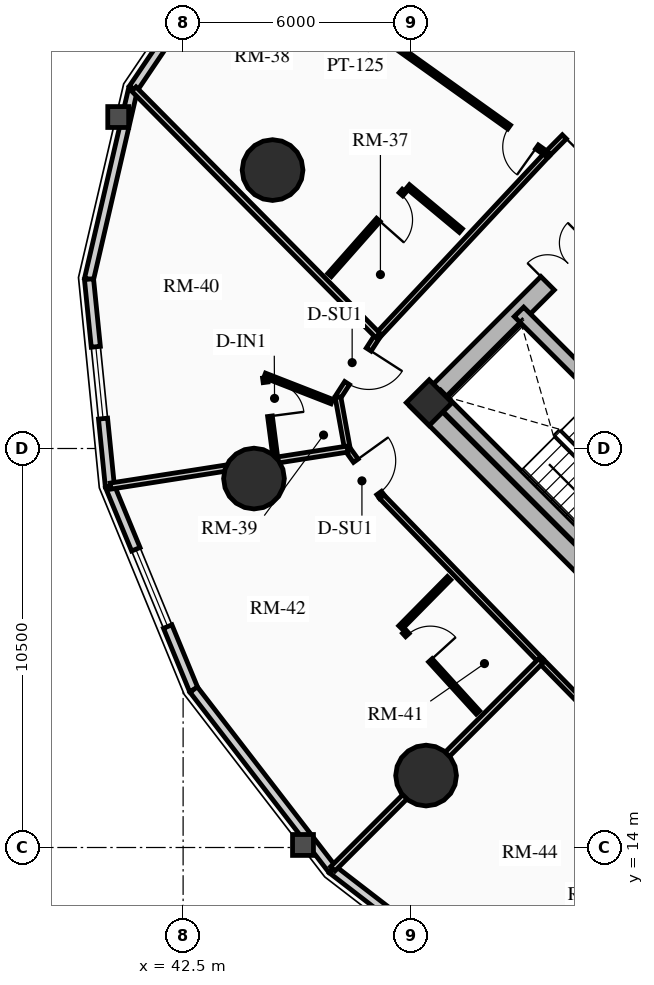
"""IFC4 building model, lengths in metres.
Left out: names, types, materials, properties, quantities, classifications, styles, units other than length and angle.
Written with IfcOpenShell. Run it as: python <this file> out.ifc"""

import sys

from ifc_helpers import new_model, si_unit, direction, frame, frame_2d, origin, origin_2d, place, context, subcontext, project, spatial, rectangle, circle, extrude, source, transform, mapped, element, fill, save


model = new_model("IFC4")
c1 = context("Model", 3, precision=1e-05, world=origin(), true_north=direction((0.0, 1.0)))
c2 = subcontext(c1, "Body", "Model", "MODEL_VIEW")
j1 = project(units=[si_unit("LENGTHUNIT", "METRE"), si_unit("PLANEANGLEUNIT", "RADIAN")], contexts=[c1])
p1 = place(None, origin())
s1 = spatial("IfcSite", under=j1, at=p1, CompositionType="ELEMENT")
p2 = place(p1, origin())
s2 = spatial("IfcBuilding", under=s1, at=p2, CompositionType="ELEMENT")
p3 = place(p2, frame((0.0, 0.0, 54.01)))
s3 = spatial("IfcBuildingStorey", under=s2, at=p3, CompositionType="ELEMENT", Elevation=54.01)
p4 = place(p3, frame((58.773, 15.661, 0.0), z_axis=(0.0, 0.0, 1.0), x_axis=(-0.707106781187, 0.707106781187, 0.0)))
e1 = element("IfcWall", 1, at=p4, inside=s3, PredefinedType="SHEAR", context=c2, shape_type="SweptSolid", body=[
    extrude(rectangle(XDim=14.3, YDim=0.5, at=frame_2d((7.15, 0.0))), origin(), (0.0, 0.0, 1.0), 2.91),
])
p5 = place(p3, frame((48.838, 25.596, 0.0), z_axis=(0.0, 0.0, 1.0), x_axis=(0.707106781187, 0.707106781187, 0.0)))
e2 = element("IfcWall", 2, at=p5, inside=s3, PredefinedType="SHEAR", context=c2, shape_type="SweptSolid", body=[
    extrude(rectangle(XDim=10.7, YDim=0.5, at=frame_2d((5.35, 0.0))), origin(), (0.0, 0.0, 1.0), 2.91),
])
m1 = source(origin(), c2, "Body", "SweptSolid", [
    extrude(rectangle(XDim=1.5, YDim=2.02, at=frame_2d((0.75, 1.01))), frame((0.0, 0.26, 0.0), z_axis=(0.0, -1.0, 0.0), x_axis=(1.0, 0.0, 0.0)), (0.0, 0.0, 1.0), 0.52),
])
p6 = place(p5, frame((4.6, 0.0, 0.0)))
e3 = element("IfcOpeningElement", 3, at=p6, cuts=e2, PredefinedType="OPENING", context=c2, shape_type="MappedRepresentation", body=[
    mapped(m1, transform((0.0, 0.0, 0.0), x_axis=(1.0, 0.0, 0.0), y_axis=(0.0, 1.0, 0.0), z_axis=(0.0, 0.0, 1.0), scale=1.0)),
])
p7 = place(p3, frame((61.096, 18.338, 0.0), z_axis=(0.0, 0.0, 1.0), x_axis=(-0.707106781187, 0.707106781187, 0.0)))
e4 = element("IfcWall", 4, at=p7, inside=s3, PredefinedType="SHEAR", context=c2, shape_type="SweptSolid", body=[
    extrude(rectangle(XDim=13.8, YDim=0.35, at=frame_2d((6.9, 0.0))), origin(), (0.0, 0.0, 1.0), 2.91),
])
m2 = source(origin(), c2, "Body", "SweptSolid", [
    extrude(rectangle(XDim=1.1, YDim=2.015, at=frame_2d((0.55, 1.007))), frame((0.0, 0.185, 0.0), z_axis=(0.0, -1.0, 0.0), x_axis=(1.0, 0.0, 0.0)), (0.0, 0.0, 1.0), 0.37),
])
p8 = place(p7, frame((4.9, 0.0, 0.0)))
e5 = element("IfcOpeningElement", 5, at=p8, cuts=e4, PredefinedType="OPENING", context=c2, shape_type="MappedRepresentation", body=[
    mapped(m2, transform((0.0, 0.0, 0.0), x_axis=(1.0, 0.0, 0.0), y_axis=(0.0, 1.0, 0.0), z_axis=(0.0, 0.0, 1.0), scale=1.0)),
])
m3 = source(origin(), c2, "Body", "SweptSolid", [
    extrude(rectangle(XDim=1.15, YDim=2.02, at=frame_2d((0.575, 1.01))), frame((0.0, 0.185, 0.0), z_axis=(0.0, -1.0, 0.0), x_axis=(1.0, 0.0, 0.0)), (0.0, 0.0, 1.0), 0.37),
])
p9 = place(p7, frame((7.32, 0.0, 0.0)))
e6 = element("IfcOpeningElement", 6, at=p9, cuts=e4, PredefinedType="OPENING", context=c2, shape_type="MappedRepresentation", body=[
    mapped(m3, transform((0.0, 0.0, 0.0), x_axis=(1.0, 0.0, 0.0), y_axis=(0.0, 1.0, 0.0), z_axis=(0.0, 0.0, 1.0), scale=1.0)),
])
p10 = place(p3, frame((53.922, 21.141, 0.0), z_axis=(0.0, 0.0, 1.0), x_axis=(-0.707106781187, 0.707106781187, 0.0)))
e7 = element("IfcWall", 7, at=p10, inside=s3, PredefinedType="SHEAR", context=c2, shape_type="SweptSolid", body=[
    extrude(rectangle(XDim=6.745, YDim=0.35, at=frame_2d((3.373, 0.0))), origin(), (0.0, 0.0, 1.0), 2.91),
])
p11 = place(p3, frame((48.976, 25.706, 0.0), z_axis=(0.0, 0.0, 1.0), x_axis=(0.707106781187, 0.707106781187, 0.0)))
e8 = element("IfcColumn", 8, at=p11, inside=s3, PredefinedType="COLUMN", context=c2, shape_type="SweptSolid", body=[
    extrude(rectangle(XDim=0.85, YDim=0.85, at=origin_2d()), origin(), (0.0, 0.0, 1.0), 2.91),
])
for number, where, z_axis, x_axis in (
    (9, (44.854, 31.827, 0.0), (0.0, 0.0, 1.0), (1.0, 0.0, 0.0)),
    (10, (44.365, 23.709, 0.0), (0.0, 0.0, 1.0), (1.0, 0.0, 0.0)),
    (11, (48.893, 15.893, 0.0), (0.0, 0.0, 1.0), (1.0, 0.0, 0.0)),
):
    element("IfcColumn", number, at=place(p3, frame(where, z_axis=z_axis, x_axis=x_axis)), inside=s3, PredefinedType="USERDEFINED", context=c2, shape_type="SweptSolid", body=[
        extrude(circle(Radius=0.8, at=origin_2d()), origin(), (0.0, 0.0, 1.0), 2.91),
    ])
p12 = place(p3, frame((41.186, 33.969, 0.0), z_axis=(0.0, 0.0, 1.0), x_axis=(0.559638693991, 0.828736708604, 0.0)))
e12 = element("IfcWall", 12, at=p12, inside=s3, PredefinedType="SOLIDWALL", context=c2, shape_type="SweptSolid", body=[
    extrude(rectangle(XDim=4.93, YDim=0.24, at=frame_2d((2.465, 0.0))), origin(), (0.0, 0.0, 1.0), 2.073),
])
m4 = source(origin(), c2, "Body", "SweptSolid", [
    extrude(rectangle(XDim=2.2, YDim=1.35, at=frame_2d((1.1, 0.675))), frame((0.0, 0.13, 0.0), z_axis=(0.0, -1.0, 0.0), x_axis=(1.0, 0.0, 0.0)), (0.0, 0.0, 1.0), 0.26),
])
p13 = place(p12, frame((1.365, 0.0, 0.65)))
e13 = element("IfcOpeningElement", 13, at=p13, cuts=e12, PredefinedType="OPENING", context=c2, shape_type="MappedRepresentation", body=[
    mapped(m4, transform((0.0, 0.0, 0.0), x_axis=(1.0, 0.0, 0.0), y_axis=(0.0, 1.0, 0.0), z_axis=(0.0, 0.0, 1.0), scale=1.0)),
])
p14 = place(p3, frame((40.024, 28.957, 0.0), z_axis=(0.0, 0.0, 1.0), x_axis=(0.225833060959, 0.974166016949, 0.0)))
e14 = element("IfcWall", 14, at=p14, inside=s3, PredefinedType="SOLIDWALL", context=c2, shape_type="SweptSolid", body=[
    extrude(rectangle(XDim=5.146, YDim=0.24, at=frame_2d((2.573, 0.0))), origin(), (0.0, 0.0, 1.0), 2.073),
])
p15 = place(p3, frame((40.572, 23.507, 0.0), z_axis=(0.0, 0.0, 1.0), x_axis=(-0.100165739718, 0.994970765694, 0.0)))
e15 = element("IfcWall", 15, at=p15, inside=s3, PredefinedType="SOLIDWALL", context=c2, shape_type="SweptSolid", body=[
    extrude(rectangle(XDim=5.477, YDim=0.24, at=frame_2d((2.738, 0.0))), origin(), (0.0, 0.0, 1.0), 2.073),
])
m5 = source(origin(), c2, "Body", "SweptSolid", [
    extrude(rectangle(XDim=1.9, YDim=1.35, at=frame_2d((0.95, 0.675))), frame((0.0, 0.13, 0.0), z_axis=(0.0, -1.0, 0.0), x_axis=(1.0, 0.0, 0.0)), (0.0, 0.0, 1.0), 0.26),
])
p16 = place(p15, frame((1.788, 0.0, 0.65)))
e16 = element("IfcOpeningElement", 16, at=p16, cuts=e15, PredefinedType="OPENING", context=c2, shape_type="MappedRepresentation", body=[
    mapped(m5, transform((0.0, 0.0, 0.0), x_axis=(1.0, 0.0, 0.0), y_axis=(0.0, 1.0, 0.0), z_axis=(0.0, 0.0, 1.0), scale=1.0)),
])
p17 = place(p3, frame((42.778, 18.156, 0.0), z_axis=(0.0, 0.0, 1.0), x_axis=(-0.381027682565, 0.924563629567, 0.0)))
e17 = element("IfcWall", 17, at=p17, inside=s3, PredefinedType="SOLIDWALL", context=c2, shape_type="SweptSolid", body=[
    extrude(rectangle(XDim=5.789, YDim=0.24, at=frame_2d((2.894, 0.0))), origin(), (0.0, 0.0, 1.0), 2.073),
])
p18 = place(p17, frame((1.794, 0.0, 0.65)))
e18 = element("IfcOpeningElement", 18, at=p18, cuts=e17, PredefinedType="OPENING", context=c2, shape_type="MappedRepresentation", body=[
    mapped(m4, transform((0.0, 0.0, 0.0), x_axis=(1.0, 0.0, 0.0), y_axis=(0.0, 1.0, 0.0), z_axis=(0.0, 0.0, 1.0), scale=1.0)),
])
p19 = place(p3, frame((46.425, 13.425, 0.0), z_axis=(0.0, 0.0, 1.0), x_axis=(-0.610502519057, 0.792014314407, 0.0)))
e19 = element("IfcWall", 19, at=p19, inside=s3, PredefinedType="SOLIDWALL", context=c2, shape_type="SweptSolid", body=[
    extrude(rectangle(XDim=5.973, YDim=0.24, at=frame_2d((2.987, 0.0))), origin(), (0.0, 0.0, 1.0), 2.073),
])
p20 = place(p3, frame((51.156, 9.778, 0.0), z_axis=(0.0, 0.0, 1.0), x_axis=(-0.792014314407, 0.610502519057, 0.0)))
e20 = element("IfcWall", 20, at=p20, inside=s3, PredefinedType="SOLIDWALL", context=c2, shape_type="SweptSolid", body=[
    extrude(rectangle(XDim=5.973, YDim=0.24, at=frame_2d((2.987, 0.0))), origin(), (0.0, 0.0, 1.0), 2.073),
])
p21 = place(p20, frame((2.037, 0.0, 0.65)))
e21 = element("IfcOpeningElement", 21, at=p21, cuts=e20, PredefinedType="OPENING", context=c2, shape_type="MappedRepresentation", body=[
    mapped(m5, transform((0.0, 0.0, 0.0), x_axis=(1.0, 0.0, 0.0), y_axis=(0.0, 1.0, 0.0), z_axis=(0.0, 0.0, 1.0), scale=1.0)),
])
p22 = place(p3, frame((54.461, 34.648, 0.0), z_axis=(0.0, 0.0, 1.0), x_axis=(-0.70403409755, -0.710166170334, 0.0)))
e22 = element("IfcWall", 22, at=p22, inside=s3, PredefinedType="PARTITIONING", context=c2, shape_type="SweptSolid", body=[
    extrude(rectangle(XDim=3.384, YDim=0.15, at=frame_2d((1.692, 0.0))), origin(), (0.0, 0.0, 1.0), 2.159),
])
m6 = source(origin(), c2, "Body", "SweptSolid", [
    extrude(rectangle(XDim=1.05, YDim=2.015, at=frame_2d((0.525, 1.007))), frame((0.0, 0.085, 0.0), z_axis=(0.0, -1.0, 0.0), x_axis=(1.0, 0.0, 0.0)), (0.0, 0.0, 1.0), 0.17),
])
p23 = place(p22, frame((1.691, 0.0, 0.0)))
e23 = element("IfcOpeningElement", 23, at=p23, cuts=e22, PredefinedType="OPENING", context=c2, shape_type="MappedRepresentation", body=[
    mapped(m6, transform((0.0, 0.0, 0.0), x_axis=(1.0, 0.0, 0.0), y_axis=(0.0, 1.0, 0.0), z_axis=(0.0, 0.0, 1.0), scale=1.0)),
])
p24 = place(p3, frame((52.079, 32.244, 0.0), z_axis=(0.0, 0.0, 1.0), x_axis=(-0.682703325574, -0.730695674854, 0.0)))
e24 = element("IfcWall", 24, at=p24, inside=s3, PredefinedType="PARTITIONING", context=c2, shape_type="SweptSolid", body=[
    extrude(rectangle(XDim=6.527, YDim=0.15, at=frame_2d((3.263, 0.0))), origin(), (0.0, 0.0, 1.0), 2.159),
])
p25 = place(p3, frame((47.623, 27.475, 0.0), z_axis=(0.0, 0.0, 1.0), x_axis=(-0.54158041545, -0.840648947898, 0.0)))
e25 = element("IfcWall", 25, at=p25, inside=s3, PredefinedType="PARTITIONING", context=c2, shape_type="SweptSolid", body=[
    extrude(rectangle(XDim=1.934, YDim=0.15, at=frame_2d((0.967, 0.0))), origin(), (0.0, 0.0, 1.0), 2.159),
])
p26 = place(p25, frame((0.442, 0.0, 0.0)))
e26 = element("IfcOpeningElement", 26, at=p26, cuts=e25, PredefinedType="OPENING", context=c2, shape_type="MappedRepresentation", body=[
    mapped(m6, transform((0.0, 0.0, 0.0), x_axis=(1.0, 0.0, 0.0), y_axis=(0.0, 1.0, 0.0), z_axis=(0.0, 0.0, 1.0), scale=1.0)),
])
p27 = place(p3, frame((46.576, 25.85, 0.0), z_axis=(0.0, 0.0, 1.0), x_axis=(0.178962865041, -0.983855829345, 0.0)))
e27 = element("IfcWall", 27, at=p27, inside=s3, PredefinedType="PARTITIONING", context=c2, shape_type="SweptSolid", body=[
    extrude(rectangle(XDim=1.387, YDim=0.15, at=frame_2d((0.694, 0.0))), origin(), (0.0, 0.0, 1.0), 2.159),
])
p28 = place(p3, frame((46.824, 24.485, 0.0), z_axis=(0.0, 0.0, 1.0), x_axis=(0.584890953925, -0.811111935565, 0.0)))
e28 = element("IfcWall", 28, at=p28, inside=s3, PredefinedType="PARTITIONING", context=c2, shape_type="SweptSolid", body=[
    extrude(rectangle(XDim=1.547, YDim=0.15, at=frame_2d((0.773, 0.0))), origin(), (0.0, 0.0, 1.0), 2.205),
])
p29 = place(p28, frame((0.377, 0.0, 0.0)))
e29 = element("IfcOpeningElement", 29, at=p29, cuts=e28, PredefinedType="OPENING", context=c2, shape_type="MappedRepresentation", body=[
    mapped(m6, transform((0.0, 0.0, 0.0), x_axis=(1.0, 0.0, 0.0), y_axis=(0.0, 1.0, 0.0), z_axis=(0.0, 0.0, 1.0), scale=1.0)),
])
p30 = place(p3, frame((47.729, 23.23, 0.0), z_axis=(0.0, 0.0, 1.0), x_axis=(0.696119834292, -0.717925606386, 0.0)))
e30 = element("IfcWall", 30, at=p30, inside=s3, PredefinedType="PARTITIONING", context=c2, shape_type="SweptSolid", body=[
    extrude(rectangle(XDim=6.012, YDim=0.15, at=frame_2d((3.006, 0.0))), origin(), (0.0, 0.0, 1.0), 2.635),
])
p31 = place(p3, frame((51.914, 18.914, 0.0), z_axis=(0.0, 0.0, 1.0), x_axis=(0.6999614951, -0.71418058317, 0.0)))
e31 = element("IfcWall", 31, at=p31, inside=s3, PredefinedType="PARTITIONING", context=c2, shape_type="SweptSolid", body=[
    extrude(rectangle(XDim=6.13, YDim=0.15, at=frame_2d((3.065, 0.0))), origin(), (0.0, 0.0, 1.0), 2.159),
])
p32 = place(p31, frame((2.54, 0.0, 0.0)))
e32 = element("IfcOpeningElement", 32, at=p32, cuts=e31, PredefinedType="OPENING", context=c2, shape_type="MappedRepresentation", body=[
    mapped(m6, transform((0.0, 0.0, 0.0), x_axis=(1.0, 0.0, 0.0), y_axis=(0.0, 1.0, 0.0), z_axis=(0.0, 0.0, 1.0), scale=1.0)),
])
p33 = place(p3, frame((54.461, 34.648, 0.0), z_axis=(0.0, 0.0, 1.0), x_axis=(-0.722290498621, 0.691589788532, 0.0)))
e33 = element("IfcWall", 33, at=p33, inside=s3, PredefinedType="PARTITIONING", context=c2, shape_type="SweptSolid", body=[
    extrude(rectangle(XDim=8.891, YDim=0.16, at=frame_2d((4.445, 0.0))), origin(), (0.0, 0.0, 1.0), 2.073),
])
p34 = place(p3, frame((47.623, 27.475, 0.0), z_axis=(0.0, 0.0, 1.0), x_axis=(-0.703512438021, 0.71068294587, 0.0)))
e34 = element("IfcWall", 34, at=p34, inside=s3, PredefinedType="PARTITIONING", context=c2, shape_type="SweptSolid", body=[
    extrude(rectangle(XDim=9.125, YDim=0.16, at=frame_2d((4.562, 0.0))), origin(), (0.0, 0.0, 1.0), 2.073),
])
p35 = place(p3, frame((46.824, 24.485, 0.0), z_axis=(0.0, 0.0, 1.0), x_axis=(-0.988003730645, -0.154430010784, 0.0)))
e35 = element("IfcWall", 35, at=p35, inside=s3, PredefinedType="PARTITIONING", context=c2, shape_type="SweptSolid", body=[
    extrude(rectangle(XDim=6.308, YDim=0.16, at=frame_2d((3.154, 0.0))), origin(), (0.0, 0.0, 1.0), 2.073),
])
p36 = place(p3, frame((51.914, 18.914, 0.0), z_axis=(0.0, 0.0, 1.0), x_axis=(-0.707106781187, -0.707106781187, 0.0)))
e36 = element("IfcWall", 36, at=p36, inside=s3, PredefinedType="PARTITIONING", context=c2, shape_type="SweptSolid", body=[
    extrude(rectangle(XDim=7.743, YDim=0.16, at=frame_2d((3.872, 0.0))), origin(), (0.0, 0.0, 1.0), 2.073),
])
p37 = place(p3, frame((52.079, 32.244, 0.0), z_axis=(0.0, 0.0, 1.0), x_axis=(-0.813888867537, 0.581020577346, 0.0)))
e37 = element("IfcWall", 37, at=p37, inside=s3, PredefinedType="PARTITIONING", context=c2, shape_type="SweptSolid", body=[
    extrude(rectangle(XDim=9.977, YDim=0.125, at=frame_2d((4.988, 0.0))), origin(), (0.0, 0.0, 1.0), 2.073),
])
m7 = source(origin(), c2, "Body", "SweptSolid", [
    extrude(rectangle(XDim=0.9, YDim=2.005, at=frame_2d((0.45, 1.002))), frame((0.0, 0.073, 0.0), z_axis=(0.0, -1.0, 0.0), x_axis=(1.0, 0.0, 0.0)), (0.0, 0.0, 1.0), 0.145),
])
p38 = place(p37, frame((0.33, 0.0, 0.0)))
e38 = element("IfcOpeningElement", 38, at=p38, cuts=e37, PredefinedType="OPENING", context=c2, shape_type="MappedRepresentation", body=[
    mapped(m7, transform((0.0, 0.0, 0.0), x_axis=(1.0, 0.0, 0.0), y_axis=(0.0, 1.0, 0.0), z_axis=(0.0, 0.0, 1.0), scale=1.0)),
])
p39 = place(p3, frame((49.809, 30.234, 0.0), z_axis=(0.0, 0.0, 1.0), x_axis=(-0.76830950514, 0.640078514177, 0.0)))
e39 = element("IfcWall", 39, at=p39, inside=s3, PredefinedType="PARTITIONING", context=c2, shape_type="SweptSolid", body=[
    extrude(rectangle(XDim=1.814, YDim=0.125, at=frame_2d((0.907, 0.0))), origin(), (0.0, 0.0, 1.0), 2.635),
])
p40 = place(p3, frame((48.313, 31.28, 0.0), z_axis=(0.0, 0.0, 1.0), x_axis=(-0.662230126621, -0.749300513409, 0.0)))
e40 = element("IfcWall", 40, at=p40, inside=s3, PredefinedType="PARTITIONING", context=c2, shape_type="SweptSolid", body=[
    extrude(rectangle(XDim=2.958, YDim=0.125, at=frame_2d((1.479, 0.0))), origin(), (0.0, 0.0, 1.0), 2.159),
])
p41 = place(p40, frame((0.12, 0.0, 0.0)))
e41 = element("IfcOpeningElement", 41, at=p41, cuts=e40, PredefinedType="OPENING", context=c2, shape_type="MappedRepresentation", body=[
    mapped(m7, transform((0.0, 0.0, 0.0), x_axis=(1.0, 0.0, 0.0), y_axis=(0.0, 1.0, 0.0), z_axis=(0.0, 0.0, 1.0), scale=1.0)),
])
p42 = place(p3, frame((46.416, 25.735, 0.0), z_axis=(0.0, 0.0, 1.0), x_axis=(-0.931623241188, 0.363425558373, 0.0)))
e42 = element("IfcWall", 42, at=p42, inside=s3, PredefinedType="PARTITIONING", context=c2, shape_type="SweptSolid", body=[
    extrude(rectangle(XDim=1.9, YDim=0.125, at=frame_2d((0.95, 0.0))), origin(), (0.0, 0.0, 1.0), 2.635),
])
p43 = place(p3, frame((44.654, 26.361, 0.0), z_axis=(0.0, 0.0, 1.0), x_axis=(0.129433729192, -0.991588074629, 0.0)))
e43 = element("IfcWall", 43, at=p43, inside=s3, PredefinedType="PARTITIONING", context=c2, shape_type="SweptSolid", body=[
    extrude(rectangle(XDim=2.097, YDim=0.125, at=frame_2d((1.049, 0.0))), origin(), (0.0, 0.0, 1.0), 2.073),
])
p44 = place(p43, frame((0.12, 0.0, 0.0)))
e44 = element("IfcOpeningElement", 44, at=p44, cuts=e43, PredefinedType="OPENING", context=c2, shape_type="MappedRepresentation", body=[
    mapped(m7, transform((0.0, 0.0, 0.0), x_axis=(1.0, 0.0, 0.0), y_axis=(0.0, 1.0, 0.0), z_axis=(0.0, 0.0, 1.0), scale=1.0)),
])
p45 = place(p3, frame((49.498, 21.087, 0.0), z_axis=(0.0, 0.0, 1.0), x_axis=(-0.702129708151, -0.71204906638, 0.0)))
e45 = element("IfcWall", 45, at=p45, inside=s3, PredefinedType="PARTITIONING", context=c2, shape_type="SweptSolid", body=[
    extrude(rectangle(XDim=1.821, YDim=0.125, at=frame_2d((0.911, 0.0))), origin(), (0.0, 0.0, 1.0), 2.635),
])
p46 = place(p3, frame((48.32, 19.68, 0.0), z_axis=(0.0, 0.0, 1.0), x_axis=(0.673403410236, -0.739275217414, 0.0)))
e46 = element("IfcWall", 46, at=p46, inside=s3, PredefinedType="PARTITIONING", context=c2, shape_type="SweptSolid", body=[
    extrude(rectangle(XDim=2.876, YDim=0.125, at=frame_2d((1.438, 0.0))), origin(), (0.0, 0.0, 1.0), 2.635),
])
p47 = place(p46, frame((0.12, 0.0, 0.0)))
e47 = element("IfcOpeningElement", 47, at=p47, cuts=e46, PredefinedType="OPENING", context=c2, shape_type="MappedRepresentation", body=[
    mapped(m7, transform((0.0, 0.0, 0.0), x_axis=(1.0, 0.0, 0.0), y_axis=(0.0, 1.0, 0.0), z_axis=(0.0, 0.0, 1.0), scale=1.0)),
])
m8 = source(origin(), c2, "Body", "SweptSolid", [
    extrude(rectangle(XDim=1.9, YDim=1.35, at=frame_2d((0.95, 0.675))), frame((0.0, 0.03, 0.0), z_axis=(0.0, -1.0, 0.0), x_axis=(1.0, 0.0, 0.0)), (0.0, 0.0, 1.0), 0.06),
])
p48 = place(p16, origin())
e48 = element("IfcWindow", 48, at=p48, inside=s3, PartitioningType="DOUBLE_PANEL_VERTICAL", PredefinedType="WINDOW", context=c2, shape_type="MappedRepresentation", body=[
    mapped(m8, transform((0.0, 0.0, 0.0), x_axis=(1.0, 0.0, 0.0), y_axis=(0.0, 1.0, 0.0), z_axis=(0.0, 0.0, 1.0), scale=1.0)),
])
fill(e16, e48)
m9 = source(origin(), c2, "Body", "SweptSolid", [
    extrude(rectangle(XDim=2.2, YDim=1.35, at=frame_2d((1.1, 0.675))), frame((0.0, 0.03, 0.0), z_axis=(0.0, -1.0, 0.0), x_axis=(1.0, 0.0, 0.0)), (0.0, 0.0, 1.0), 0.06),
])
p49 = place(p18, origin())
e49 = element("IfcWindow", 49, at=p49, inside=s3, PartitioningType="DOUBLE_PANEL_VERTICAL", PredefinedType="WINDOW", context=c2, shape_type="MappedRepresentation", body=[
    mapped(m9, transform((0.0, 0.0, 0.0), x_axis=(1.0, 0.0, 0.0), y_axis=(0.0, 1.0, 0.0), z_axis=(0.0, 0.0, 1.0), scale=1.0)),
])
fill(e18, e49)
m10 = source(origin(), c2, "Body", "SweptSolid", [
    extrude(rectangle(XDim=1.5, YDim=2.02, at=frame_2d((0.75, 1.01))), frame((0.0, 0.025, 0.0), z_axis=(0.0, -1.0, 0.0), x_axis=(1.0, 0.0, 0.0)), (0.0, 0.0, 1.0), 0.05),
])
p50 = place(p6, origin())
e50 = element("IfcDoor", 50, at=p50, inside=s3, OperationType="DOUBLE_DOOR_SINGLE_SWING", PredefinedType="DOOR", context=c2, shape_type="MappedRepresentation", body=[
    mapped(m10, transform((0.0, 0.0, 0.0), x_axis=(1.0, 0.0, 0.0), y_axis=(0.0, 1.0, 0.0), z_axis=(0.0, 0.0, 1.0), scale=1.0)),
])
fill(e3, e50)
m11 = source(origin(), c2, "Body", "SweptSolid", [
    extrude(rectangle(XDim=1.05, YDim=2.015, at=frame_2d((0.525, 1.007))), frame((0.0, 0.025, 0.0), z_axis=(0.0, -1.0, 0.0), x_axis=(1.0, 0.0, 0.0)), (0.0, 0.0, 1.0), 0.05),
])
p51 = place(p23, origin())
e51 = element("IfcDoor", 51, at=p51, inside=s3, OperationType="SINGLE_SWING_RIGHT", PredefinedType="DOOR", context=c2, shape_type="MappedRepresentation", body=[
    mapped(m11, transform((0.0, 0.0, 0.0), x_axis=(1.0, 0.0, 0.0), y_axis=(0.0, 1.0, 0.0), z_axis=(0.0, 0.0, 1.0), scale=1.0)),
])
fill(e23, e51)
m12 = source(origin(), c2, "Body", "SweptSolid", [
    extrude(rectangle(XDim=0.9, YDim=2.005, at=frame_2d((0.45, 1.002))), frame((0.0, 0.025, 0.0), z_axis=(0.0, -1.0, 0.0), x_axis=(1.0, 0.0, 0.0)), (0.0, 0.0, 1.0), 0.05),
])
p52 = place(p38, origin())
e52 = element("IfcDoor", 52, at=p52, inside=s3, OperationType="SINGLE_SWING_LEFT", PredefinedType="DOOR", context=c2, shape_type="MappedRepresentation", body=[
    mapped(m12, transform((0.0, 0.0, 0.0), x_axis=(1.0, 0.0, 0.0), y_axis=(0.0, 1.0, 0.0), z_axis=(0.0, 0.0, 1.0), scale=1.0)),
])
fill(e38, e52)
p53 = place(p41, origin())
e53 = element("IfcDoor", 53, at=p53, inside=s3, OperationType="SINGLE_SWING_RIGHT", PredefinedType="DOOR", context=c2, shape_type="MappedRepresentation", body=[
    mapped(m12, transform((0.0, 0.0, 0.0), x_axis=(1.0, 0.0, 0.0), y_axis=(0.0, 1.0, 0.0), z_axis=(0.0, 0.0, 1.0), scale=1.0)),
])
fill(e41, e53)
p54 = place(p26, origin())
e54 = element("IfcDoor", 54, at=p54, inside=s3, OperationType="SINGLE_SWING_LEFT", PredefinedType="DOOR", context=c2, shape_type="MappedRepresentation", body=[
    mapped(m11, transform((0.0, 0.0, 0.0), x_axis=(1.0, 0.0, 0.0), y_axis=(0.0, 1.0, 0.0), z_axis=(0.0, 0.0, 1.0), scale=1.0)),
])
fill(e26, e54)
p55 = place(p44, origin())
e55 = element("IfcDoor", 55, at=p55, inside=s3, OperationType="SINGLE_SWING_RIGHT", PredefinedType="DOOR", context=c2, shape_type="MappedRepresentation", body=[
    mapped(m12, transform((0.0, 0.0, 0.0), x_axis=(1.0, 0.0, 0.0), y_axis=(0.0, 1.0, 0.0), z_axis=(0.0, 0.0, 1.0), scale=1.0)),
])
fill(e44, e55)
p56 = place(p29, origin())
e56 = element("IfcDoor", 56, at=p56, inside=s3, OperationType="SINGLE_SWING_LEFT", PredefinedType="DOOR", context=c2, shape_type="MappedRepresentation", body=[
    mapped(m11, transform((0.0, 0.0, 0.0), x_axis=(1.0, 0.0, 0.0), y_axis=(0.0, 1.0, 0.0), z_axis=(0.0, 0.0, 1.0), scale=1.0)),
])
fill(e29, e56)
p57 = place(p47, origin())
e57 = element("IfcDoor", 57, at=p57, inside=s3, OperationType="SINGLE_SWING_RIGHT", PredefinedType="DOOR", context=c2, shape_type="MappedRepresentation", body=[
    mapped(m12, transform((0.0, 0.0, 0.0), x_axis=(1.0, 0.0, 0.0), y_axis=(0.0, 1.0, 0.0), z_axis=(0.0, 0.0, 1.0), scale=1.0)),
])
fill(e47, e57)
save(model, sys.argv[1])
